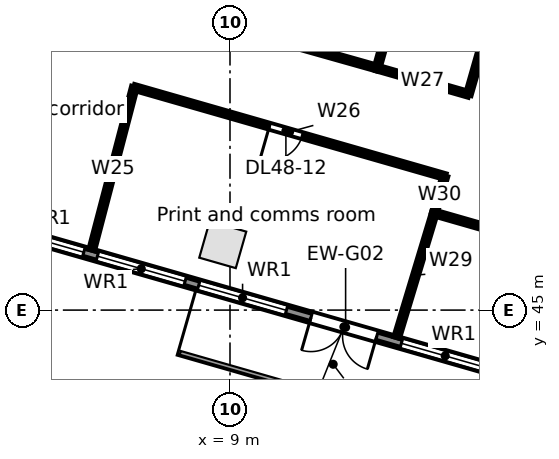
"""IFC4 building model, lengths in metres.
Left out: names, types, materials, properties, quantities, classifications, styles, units other than length and angle.
Written with IfcOpenShell. Run it as: python <this file> out.ifc"""

import sys

from ifc_helpers import new_model, si_unit, direction, frame, frame_2d, origin, origin_2d, place, context, subcontext, project, spatial, rectangle, extrude, element, fill, save


model = new_model("IFC4")
c1 = context("Model", 3, precision=1e-05, world=origin(), true_north=direction((0.0, 1.0)))
c2 = subcontext(c1, "Body", "Model", "MODEL_VIEW")
j1 = project(units=[si_unit("LENGTHUNIT", "METRE"), si_unit("PLANEANGLEUNIT", "RADIAN")], contexts=[c1])
p1 = place(None, origin())
s1 = spatial("IfcSite", under=j1, at=p1, CompositionType="ELEMENT")
p2 = place(p1, origin())
s2 = spatial("IfcBuilding", under=s1, at=p2, CompositionType="ELEMENT")
p3 = place(p2, frame((0.0, 0.0, 227.0)))
s3 = spatial("IfcBuildingStorey", under=s2, at=p3, CompositionType="ELEMENT", Elevation=227.0)
p4 = place(p3, frame((8.81, 46.722, 0.0), z_axis=(0.0, 0.0, 1.0), x_axis=(0.961261695938, -0.275637355817, 0.0)))
e1 = element("IfcColumn", 1, at=p4, inside=s3, PredefinedType="COLUMN", context=c2, shape_type="SweptSolid", body=[
    extrude(rectangle(XDim=1.0, YDim=1.0, at=origin_2d()), origin(), (0.0, 0.0, 1.0), 3.9),
])
p5 = place(p3, frame((24.034, 41.108, 0.0), z_axis=(0.0, 0.0, 1.0), x_axis=(-0.96126060691, 0.275641153683, 0.0)))
e2 = element("IfcWall", 2, at=p5, inside=s3, PredefinedType="STANDARD", context=c2, shape_type="SweptSolid", body=[
    extrude(rectangle(XDim=24.951, YDim=0.25, at=frame_2d((12.475, 0.0))), origin(), (0.0, 0.0, 1.0), 3.55),
])
p6 = place(p5, frame((22.416, 0.0, 0.8)))
e3 = element("IfcOpeningElement", 3, at=p6, cuts=e2, PredefinedType="OPENING", context=c2, shape_type="SweptSolid", body=[
    extrude(rectangle(XDim=2.4, YDim=2.2, at=frame_2d((1.2, 1.1))), frame((0.0, 0.135, 0.0), z_axis=(0.0, -1.0, 0.0), x_axis=(1.0, 0.0, 0.0)), (0.0, 0.0, 1.0), 0.27),
])
p7 = place(p5, frame((19.643, 0.0, 0.8)))
e4 = element("IfcOpeningElement", 4, at=p7, cuts=e2, PredefinedType="OPENING", context=c2, shape_type="SweptSolid", body=[
    extrude(rectangle(XDim=2.4, YDim=2.2, at=frame_2d((1.2, 1.1))), frame((0.0, 0.135, 0.0), z_axis=(0.0, -1.0, 0.0), x_axis=(1.0, 0.0, 0.0)), (0.0, 0.0, 1.0), 0.27),
])
p8 = place(p5, frame((16.869, 0.0, 0.8)))
e5 = element("IfcOpeningElement", 5, at=p8, cuts=e2, PredefinedType="OPENING", context=c2, shape_type="SweptSolid", body=[
    extrude(rectangle(XDim=2.4, YDim=2.2, at=frame_2d((1.2, 1.1))), frame((0.0, 0.135, 0.0), z_axis=(0.0, -1.0, 0.0), x_axis=(1.0, 0.0, 0.0)), (0.0, 0.0, 1.0), 0.27),
])
p9 = place(p5, frame((14.096, 0.0, 0.8)))
e6 = element("IfcOpeningElement", 6, at=p9, cuts=e2, PredefinedType="OPENING", context=c2, shape_type="SweptSolid", body=[
    extrude(rectangle(XDim=2.4, YDim=2.2, at=frame_2d((1.2, 1.1))), frame((0.0, 0.135, 0.0), z_axis=(0.0, -1.0, 0.0), x_axis=(1.0, 0.0, 0.0)), (0.0, 0.0, 1.0), 0.27),
])
p10 = place(p5, frame((11.622, 0.0, 0.0)))
e7 = element("IfcOpeningElement", 7, at=p10, cuts=e2, PredefinedType="OPENING", context=c2, shape_type="SweptSolid", body=[
    extrude(rectangle(XDim=1.8, YDim=2.4, at=frame_2d((0.9, 1.2))), frame((0.0, 0.135, 0.0), z_axis=(0.0, -1.0, 0.0), x_axis=(1.0, 0.0, 0.0)), (0.0, 0.0, 1.0), 0.27),
])
p11 = place(p5, frame((8.549, 0.0, 0.8)))
e8 = element("IfcOpeningElement", 8, at=p11, cuts=e2, PredefinedType="OPENING", context=c2, shape_type="SweptSolid", body=[
    extrude(rectangle(XDim=2.4, YDim=2.2, at=frame_2d((1.2, 1.1))), frame((0.0, 0.135, 0.0), z_axis=(0.0, -1.0, 0.0), x_axis=(1.0, 0.0, 0.0)), (0.0, 0.0, 1.0), 0.27),
])
p12 = place(p5, frame((5.775, 0.0, 0.8)))
e9 = element("IfcOpeningElement", 9, at=p12, cuts=e2, PredefinedType="OPENING", context=c2, shape_type="SweptSolid", body=[
    extrude(rectangle(XDim=2.4, YDim=2.2, at=frame_2d((1.2, 1.1))), frame((0.0, 0.135, 0.0), z_axis=(0.0, -1.0, 0.0), x_axis=(1.0, 0.0, 0.0)), (0.0, 0.0, 1.0), 0.27),
])
p13 = place(p5, frame((3.302, 0.0, 0.0)))
e10 = element("IfcOpeningElement", 10, at=p13, cuts=e2, PredefinedType="OPENING", context=c2, shape_type="SweptSolid", body=[
    extrude(rectangle(XDim=1.8, YDim=2.4, at=frame_2d((0.9, 1.2))), frame((0.0, 0.135, 0.0), z_axis=(0.0, -1.0, 0.0), x_axis=(1.0, 0.0, 0.0)), (0.0, 0.0, 1.0), 0.27),
])
p14 = place(p5, frame((0.229, 0.0, 0.8)))
e11 = element("IfcOpeningElement", 11, at=p14, cuts=e2, PredefinedType="OPENING", context=c2, shape_type="SweptSolid", body=[
    extrude(rectangle(XDim=2.4, YDim=2.2, at=frame_2d((1.2, 1.1))), frame((0.0, 0.135, 0.0), z_axis=(0.0, -1.0, 0.0), x_axis=(1.0, 0.0, 0.0)), (0.0, 0.0, 1.0), 0.27),
])
p15 = place(p3, frame((0.0, 55.0, 0.0), z_axis=(0.0, 0.0, 1.0), x_axis=(0.962402937884, -0.271625818271, 0.0)))
e12 = element("IfcWall", 12, at=p15, inside=s3, PredefinedType="PARTITIONING", context=c2, shape_type="SweptSolid", body=[
    extrude(rectangle(XDim=13.372, YDim=0.125, at=frame_2d((6.686, 0.0))), origin(), (0.0, 0.0, 1.0), 2.618),
])
p16 = place(p15, frame((5.7, 0.0, 0.0)))
e13 = element("IfcOpeningElement", 13, at=p16, cuts=e12, PredefinedType="OPENING", context=c2, shape_type="SweptSolid", body=[
    extrude(rectangle(XDim=1.8, YDim=2.1, at=frame_2d((0.9, 1.05))), frame((0.0, 0.073, 0.0), z_axis=(0.0, -1.0, 0.0), x_axis=(1.0, 0.0, 0.0)), (0.0, 0.0, 1.0), 0.145),
])
p17 = place(p3, frame((5.364, 46.592, 0.0), z_axis=(0.0, 0.0, 1.0), x_axis=(0.253446952203, 0.967349286669, 0.0)))
e14 = element("IfcWall", 14, at=p17, inside=s3, PredefinedType="PARTITIONING", context=c2, shape_type="SweptSolid", body=[
    extrude(rectangle(XDim=4.411, YDim=0.125, at=frame_2d((2.206, 0.0))), origin(), (0.0, 0.0, 1.0), 2.83),
])
p18 = place(p3, frame((6.482, 50.859, 0.0), z_axis=(0.0, 0.0, 1.0), x_axis=(0.961261196169, -0.275639098713, 0.0)))
e15 = element("IfcWall", 15, at=p18, inside=s3, PredefinedType="PARTITIONING", context=c2, shape_type="SweptSolid", body=[
    extrude(rectangle(XDim=8.5, YDim=0.125, at=frame_2d((4.25, 0.0))), origin(), (0.0, 0.0, 1.0), 2.618),
])
p19 = place(p18, frame((3.7, 0.0, 0.0)))
e16 = element("IfcOpeningElement", 16, at=p19, cuts=e15, PredefinedType="OPENING", context=c2, shape_type="SweptSolid", body=[
    extrude(rectangle(XDim=0.9, YDim=2.1, at=frame_2d((0.45, 1.05))), frame((0.0, 0.073, 0.0), z_axis=(0.0, -1.0, 0.0), x_axis=(1.0, 0.0, 0.0)), (0.0, 0.0, 1.0), 0.145),
])
p20 = place(p3, frame((12.869, 51.368, 0.0), z_axis=(0.0, 0.0, 1.0), x_axis=(0.961302601161, -0.275494662382, 0.0)))
e17 = element("IfcWall", 17, at=p20, inside=s3, PredefinedType="PARTITIONING", context=c2, shape_type="SweptSolid", body=[
    extrude(rectangle(XDim=2.501, YDim=0.125, at=frame_2d((1.25, 0.0))), origin(), (0.0, 0.0, 1.0), 3.55),
])
p21 = place(p3, frame((12.869, 51.368, 0.0), z_axis=(0.0, 0.0, 1.0), x_axis=(0.269547555311, 0.962987079574, 0.0)))
e18 = element("IfcWall", 18, at=p21, inside=s3, PredefinedType="PARTITIONING", context=c2, shape_type="SweptSolid", body=[
    extrude(rectangle(XDim=16.161, YDim=0.125, at=frame_2d((8.081, 0.0))), origin(), (0.0, 0.0, 1.0), 2.618),
])
p22 = place(p3, frame((13.39, 44.29, 0.0), z_axis=(0.0, 0.0, 1.0), x_axis=(0.289389501276, 0.957211427299, 0.0)))
e19 = element("IfcWall", 19, at=p22, inside=s3, PredefinedType="PARTITIONING", context=c2, shape_type="SweptSolid", body=[
    extrude(rectangle(XDim=3.411, YDim=0.125, at=frame_2d((1.706, 0.0))), origin(), (0.0, 0.0, 1.0), 2.83),
])
p23 = place(p3, frame((14.377, 47.555, 0.0), z_axis=(0.0, 0.0, 1.0), x_axis=(0.275204870584, 0.961385603807, 0.0)))
e20 = element("IfcWall", 20, at=p23, inside=s3, PredefinedType="PARTITIONING", context=c2, shape_type="SweptSolid", body=[
    extrude(rectangle(XDim=1.0, YDim=0.125, at=frame_2d((0.5, 0.0))), origin(), (0.0, 0.0, 1.0), 3.55),
])
p24 = place(p3, frame((14.377, 47.555, 0.0), z_axis=(0.0, 0.0, 1.0), x_axis=(0.961263044958, -0.275632651182, 0.0)))
e21 = element("IfcWall", 21, at=p24, inside=s3, PredefinedType="PARTITIONING", context=c2, shape_type="SweptSolid", body=[
    extrude(rectangle(XDim=11.0, YDim=0.125, at=frame_2d((5.5, 0.0))), origin(), (0.0, 0.0, 1.0), 2.822),
])
p25 = place(p24, frame((4.95, 0.0, 0.0)))
e22 = element("IfcOpeningElement", 22, at=p25, cuts=e21, PredefinedType="OPENING", context=c2, shape_type="SweptSolid", body=[
    extrude(rectangle(XDim=0.9, YDim=2.1, at=frame_2d((0.45, 1.05))), frame((0.0, 0.073, 0.0), z_axis=(0.0, -1.0, 0.0), x_axis=(1.0, 0.0, 0.0)), (0.0, 0.0, 1.0), 0.145),
])
p26 = place(p3, frame((15.273, 50.679, 0.0), z_axis=(0.0, 0.0, 1.0), x_axis=(0.275494973205, 0.961302512084, 0.0)))
e23 = element("IfcWall", 23, at=p26, inside=s3, PredefinedType="PARTITIONING", context=c2, shape_type="SweptSolid", body=[
    extrude(rectangle(XDim=5.75, YDim=0.125, at=frame_2d((2.875, 0.0))), origin(), (0.0, 0.0, 1.0), 2.618),
])
p27 = place(p26, frame((2.45, 0.0, 0.0)))
e24 = element("IfcOpeningElement", 24, at=p27, cuts=e23, PredefinedType="OPENING", context=c2, shape_type="SweptSolid", body=[
    extrude(rectangle(XDim=0.9, YDim=2.1, at=frame_2d((0.45, 1.05))), frame((0.0, 0.073, 0.0), z_axis=(0.0, -1.0, 0.0), x_axis=(1.0, 0.0, 0.0)), (0.0, 0.0, 1.0), 0.145),
])
p28 = place(p7, origin())
e25 = element("IfcWindow", 25, at=p28, inside=s3, PartitioningType="SINGLE_PANEL", PredefinedType="WINDOW", context=c2, shape_type="SweptSolid", body=[
    extrude(rectangle(XDim=2.4, YDim=2.2, at=frame_2d((1.2, 1.1))), frame((0.0, 0.03, 0.0), z_axis=(0.0, -1.0, 0.0), x_axis=(1.0, 0.0, 0.0)), (0.0, 0.0, 1.0), 0.06),
])
fill(e4, e25)
p29 = place(p8, origin())
e26 = element("IfcWindow", 26, at=p29, inside=s3, PartitioningType="SINGLE_PANEL", PredefinedType="WINDOW", context=c2, shape_type="SweptSolid", body=[
    extrude(rectangle(XDim=2.4, YDim=2.2, at=frame_2d((1.2, 1.1))), frame((0.0, 0.03, 0.0), z_axis=(0.0, -1.0, 0.0), x_axis=(1.0, 0.0, 0.0)), (0.0, 0.0, 1.0), 0.06),
])
fill(e5, e26)
p30 = place(p9, origin())
e27 = element("IfcWindow", 27, at=p30, inside=s3, PartitioningType="SINGLE_PANEL", PredefinedType="WINDOW", context=c2, shape_type="SweptSolid", body=[
    extrude(rectangle(XDim=2.4, YDim=2.2, at=frame_2d((1.2, 1.1))), frame((0.0, 0.03, 0.0), z_axis=(0.0, -1.0, 0.0), x_axis=(1.0, 0.0, 0.0)), (0.0, 0.0, 1.0), 0.06),
])
fill(e6, e27)
p31 = place(p10, origin())
e28 = element("IfcDoor", 28, at=p31, inside=s3, OperationType="DOUBLE_DOOR_SINGLE_SWING", PredefinedType="DOOR", context=c2, shape_type="SweptSolid", body=[
    extrude(rectangle(XDim=1.8, YDim=2.4, at=frame_2d((0.9, 1.2))), frame((0.0, 0.025, 0.0), z_axis=(0.0, -1.0, 0.0), x_axis=(1.0, 0.0, 0.0)), (0.0, 0.0, 1.0), 0.05),
])
fill(e7, e28)
p32 = place(p11, origin())
e29 = element("IfcWindow", 29, at=p32, inside=s3, PartitioningType="SINGLE_PANEL", PredefinedType="WINDOW", context=c2, shape_type="SweptSolid", body=[
    extrude(rectangle(XDim=2.4, YDim=2.2, at=frame_2d((1.2, 1.1))), frame((0.0, 0.03, 0.0), z_axis=(0.0, -1.0, 0.0), x_axis=(1.0, 0.0, 0.0)), (0.0, 0.0, 1.0), 0.06),
])
fill(e8, e29)
p33 = place(p19, frame((0.9, 0.0, 0.0), z_axis=(0.0, 0.0, 1.0), x_axis=(-1.0, 0.0, 0.0)))
e30 = element("IfcDoor", 30, at=p33, inside=s3, OperationType="SINGLE_SWING_RIGHT", PredefinedType="DOOR", context=c2, shape_type="SweptSolid", body=[
    extrude(rectangle(XDim=0.9, YDim=2.1, at=frame_2d((0.45, 1.05))), frame((0.0, 0.025, 0.0), z_axis=(0.0, -1.0, 0.0), x_axis=(1.0, 0.0, 0.0)), (0.0, 0.0, 1.0), 0.05),
])
fill(e16, e30)
save(model, sys.argv[1])
